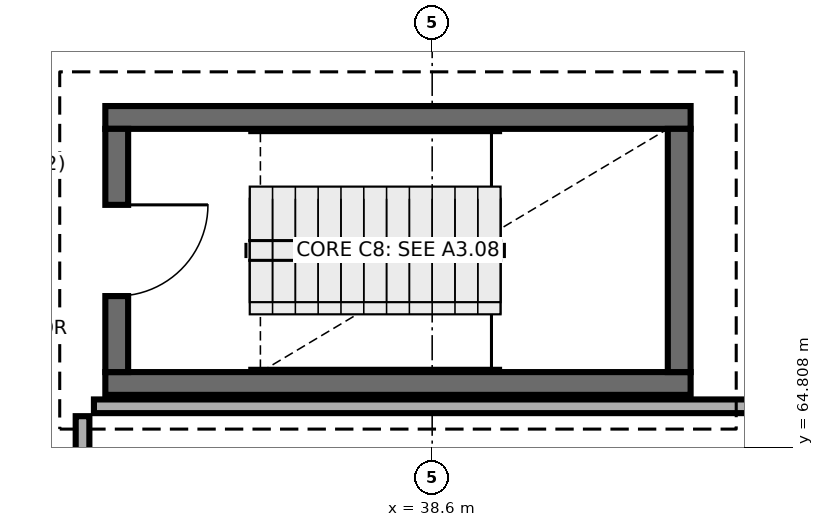
"""IFC4 building model, lengths in metres.
Left out: names, types, materials, properties, quantities, classifications, styles, units other than length and angle.
Written with IfcOpenShell. Run it as: python <this file> out.ifc"""

import sys

from ifc_helpers import new_model, si_unit, direction, frame, frame_2d, origin, place, context, subcontext, project, spatial, rectangle, extrude, element, fill, save


model = new_model("IFC4")
c1 = context("Model", 3, precision=1e-05, world=origin(), true_north=direction((0.0, 1.0)))
c2 = subcontext(c1, "Body", "Model", "MODEL_VIEW")
j1 = project(units=[si_unit("LENGTHUNIT", "METRE"), si_unit("PLANEANGLEUNIT", "RADIAN")], contexts=[c1])
p1 = place(None, origin())
s1 = spatial("IfcSite", under=j1, at=p1, CompositionType="ELEMENT")
p2 = place(p1, origin())
s2 = spatial("IfcBuilding", under=s1, at=p2, CompositionType="ELEMENT")
p3 = place(p2, frame((0.0, 0.0, 18.3)))
s3 = spatial("IfcBuildingStorey", under=s2, at=p3, CompositionType="ELEMENT", Elevation=18.3)
for number, where, z_axis, x_axis in (
    (1, (34.3, 65.65, 0.0), (0.0, 0.0, 1.0), (1.0, 0.0, 0.0)),
    (2, (42.0, 69.15, 0.0), (0.0, 0.0, 1.0), (-1.0, 0.0, 0.0)),
):
    element("IfcWall", number, at=place(p3, frame(where, z_axis=z_axis, x_axis=x_axis)), inside=s3, PredefinedType="SHEAR", context=c2, shape_type="SweptSolid", body=[
        extrude(rectangle(XDim=7.7, YDim=0.3, at=frame_2d((3.85, 0.0))), origin(), (0.0, 0.0, 1.0), 4.5),
    ])
p4 = place(p3, frame((34.45, 69.0, 0.0), z_axis=(0.0, 0.0, 1.0), x_axis=(0.0, -1.0, 0.0)))
e3 = element("IfcWall", 3, at=p4, inside=s3, PredefinedType="SHEAR", context=c2, shape_type="SweptSolid", body=[
    extrude(rectangle(XDim=3.2, YDim=0.3, at=frame_2d((1.6, 0.0))), origin(), (0.0, 0.0, 1.0), 4.5),
])
p5 = place(p4, frame((1.0, 0.0, 0.0)))
e4 = element("IfcOpeningElement", 4, at=p5, cuts=e3, PredefinedType="OPENING", context=c2, shape_type="SweptSolid", body=[
    extrude(rectangle(XDim=1.2, YDim=2.15, at=frame_2d((0.6, 1.075))), frame((0.0, 0.16, 0.0), z_axis=(0.0, -1.0, 0.0), x_axis=(1.0, 0.0, 0.0)), (0.0, 0.0, 1.0), 0.32),
])
p6 = place(p3, frame((41.85, 65.8, 0.0), z_axis=(0.0, 0.0, 1.0), x_axis=(0.0, 1.0, 0.0)))
e5 = element("IfcWall", 5, at=p6, inside=s3, PredefinedType="SHEAR", context=c2, shape_type="SweptSolid", body=[
    extrude(rectangle(XDim=3.2, YDim=0.3, at=frame_2d((1.6, 0.0))), origin(), (0.0, 0.0, 1.0), 4.5),
])
p7 = place(p3, frame((34.15, 65.35, 0.0), z_axis=(0.0, 0.0, 1.0), x_axis=(1.0, 0.0, 0.0)))
e6 = element("IfcWall", 6, at=p7, inside=s3, PredefinedType="PARTITIONING", context=c2, shape_type="SweptSolid", body=[
    extrude(rectangle(XDim=12.965, YDim=0.18, at=frame_2d((6.482, 0.0))), origin(), (0.0, 0.0, 1.0), 4.28),
])
p8 = place(p3, frame((34.0, 61.75, 0.0), z_axis=(0.0, 0.0, 1.0), x_axis=(0.0, 1.0, 0.0)))
e7 = element("IfcWall", 7, at=p8, inside=s3, PredefinedType="PARTITIONING", context=c2, shape_type="SweptSolid", body=[
    extrude(rectangle(XDim=3.47, YDim=0.18, at=frame_2d((1.735, 0.0))), origin(), (0.0, 0.0, 1.0), 4.28),
])
p9 = place(p8, frame((1.285, 0.0, 0.0)))
e8 = element("IfcOpeningElement", 8, at=p9, cuts=e7, PredefinedType="OPENING", context=c2, shape_type="SweptSolid", body=[
    extrude(rectangle(XDim=0.9, YDim=2.1, at=frame_2d((0.45, 1.05))), frame((0.0, 0.1, 0.0), z_axis=(0.0, -1.0, 0.0), x_axis=(1.0, 0.0, 0.0)), (0.0, 0.0, 1.0), 0.2),
])
p10 = place(p5, origin())
e9 = element("IfcDoor", 9, at=p10, inside=s3, OperationType="SINGLE_SWING_LEFT", PredefinedType="DOOR", context=c2, shape_type="SweptSolid", body=[
    extrude(rectangle(XDim=1.2, YDim=2.15, at=frame_2d((0.6, 1.075))), frame((0.0, 0.025, 0.0), z_axis=(0.0, -1.0, 0.0), x_axis=(1.0, 0.0, 0.0)), (0.0, 0.0, 1.0), 0.05),
])
fill(e4, e9)
save(model, sys.argv[1])
